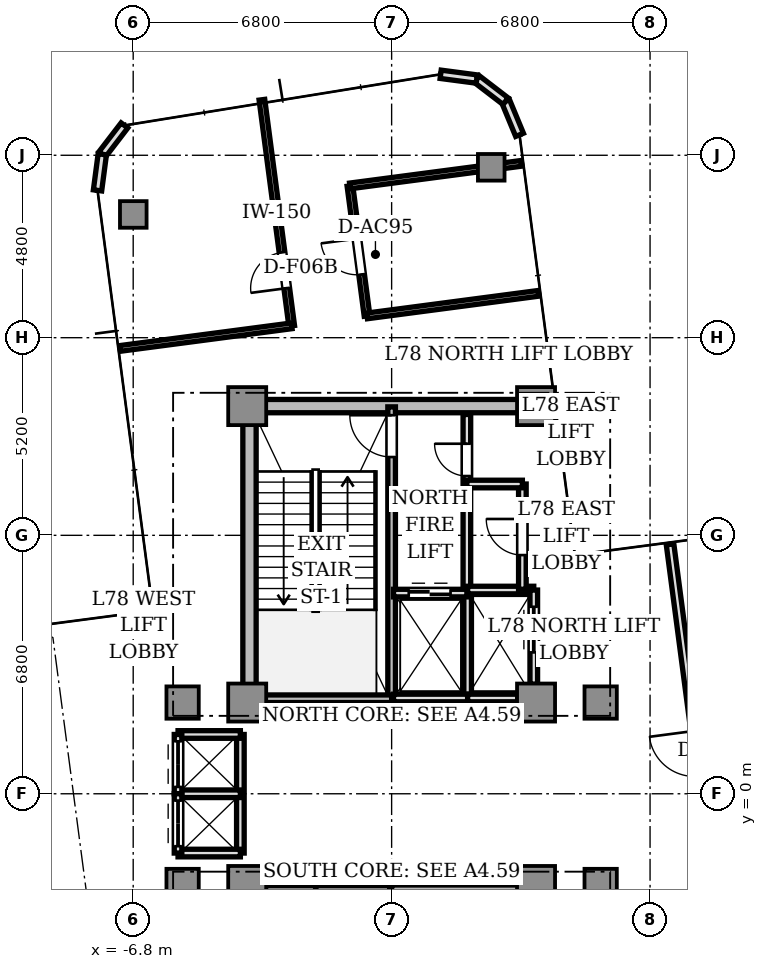
"""IFC4 building model, lengths in metres.
Left out: names, types, materials, properties, quantities, classifications, styles, units other than length and angle.
Written with IfcOpenShell. Run it as: python <this file> out.ifc"""

import sys

from ifc_helpers import new_model, si_unit, direction, frame, frame_2d, origin, origin_2d, place, context, subcontext, project, spatial, rectangle, extrude, source, transform, mapped, element, fill, save


model = new_model("IFC4")
c1 = context("Model", 3, precision=1e-05, world=origin(), true_north=direction((0.0, 1.0)))
c2 = subcontext(c1, "Body", "Model", "MODEL_VIEW")
j1 = project(units=[si_unit("LENGTHUNIT", "METRE"), si_unit("PLANEANGLEUNIT", "RADIAN")], contexts=[c1])
p1 = place(None, origin())
s1 = spatial("IfcSite", under=j1, at=p1, CompositionType="ELEMENT")
p2 = place(p1, origin())
s2 = spatial("IfcBuilding", under=s1, at=p2, CompositionType="ELEMENT")
p3 = place(p2, frame((0.0, 0.0, 280.3)))
s3 = spatial("IfcBuildingStorey", under=s2, at=p3, CompositionType="ELEMENT", Elevation=280.3)
p4 = place(p3, frame((-3.55, 10.2, 0.0), z_axis=(0.0, 0.0, 1.0), x_axis=(1.0, 0.0, 0.0)))
e1 = element("IfcWall", 1, at=p4, inside=s3, PredefinedType="SHEAR", context=c2, shape_type="SweptSolid", body=[
    extrude(rectangle(XDim=7.1, YDim=0.35, at=frame_2d((3.55, 0.0))), origin(), (0.0, 0.0, 1.0), 4.5),
])
p5 = place(p3, frame((-3.74, 2.85, 0.0), z_axis=(0.0, 0.0, 1.0), x_axis=(0.0, 1.0, 0.0)))
e2 = element("IfcWall", 2, at=p5, inside=s3, PredefinedType="SHEAR", context=c2, shape_type="SweptSolid", body=[
    extrude(rectangle(XDim=6.9, YDim=0.35, at=frame_2d((3.45, 0.0))), origin(), (0.0, 0.0, 1.0), 4.5),
])
m1 = source(origin(), c2, "Body", "SweptSolid", [
    extrude(rectangle(XDim=1.0, YDim=1.0, at=origin_2d()), origin(), (0.0, 0.0, 1.0), 4.5),
])
for number, where, z_axis, x_axis in (
    (3, (-3.8, 2.4, 0.0), (0.0, 0.0, 1.0), (1.0, 0.0, 0.0)),
    (4, (3.8, 2.4, 0.0), (0.0, 0.0, 1.0), (1.0, 0.0, 0.0)),
    (5, (-3.8, 10.2, 0.0), (0.0, 0.0, 1.0), (1.0, 0.0, 0.0)),
    (6, (3.8, 10.2, 0.0), (0.0, 0.0, 1.0), (1.0, 0.0, 0.0)),
    (7, (-3.8, -2.4, 0.0), (0.0, 0.0, 1.0), (1.0, 0.0, 0.0)),
    (8, (3.8, -2.4, 0.0), (0.0, 0.0, 1.0), (1.0, 0.0, 0.0)),
):
    element("IfcColumn", number, at=place(p3, frame(where, z_axis=z_axis, x_axis=x_axis)), inside=s3, PredefinedType="COLUMN", context=c2, shape_type="MappedRepresentation", body=[
        mapped(m1, transform((0.0, 0.0, 0.0), scale=1.0)),
    ])
m2 = source(origin(), c2, "Body", "SweptSolid", [
    extrude(rectangle(XDim=0.85, YDim=0.85, at=origin_2d()), origin(), (0.0, 0.0, 1.0), 4.5),
])
for number, where, z_axis, x_axis in (
    (9, (5.5, 2.4, 0.0), (0.0, 0.0, 1.0), (1.0, 0.0, 0.0)),
    (10, (-5.5, 2.4, 0.0), (0.0, 0.0, 1.0), (1.0, 0.0, 0.0)),
    (11, (5.5, -2.4, 0.0), (0.0, 0.0, 1.0), (1.0, 0.0, 0.0)),
    (12, (-5.5, -2.4, 0.0), (0.0, 0.0, 1.0), (1.0, 0.0, 0.0)),
):
    element("IfcColumn", number, at=place(p3, frame(where, z_axis=z_axis, x_axis=x_axis)), inside=s3, PredefinedType="COLUMN", context=c2, shape_type="MappedRepresentation", body=[
        mapped(m2, transform((0.0, 0.0, 0.0), scale=1.0)),
    ])
m3 = source(origin(), c2, "Body", "SweptSolid", [
    extrude(rectangle(XDim=0.7, YDim=0.7, at=origin_2d()), origin(), (0.0, 0.0, 1.0), 4.5),
])
for number, where, z_axis, x_axis in (
    (13, (2.621, 16.483, 0.0), (0.0, 0.0, 1.0), (1.0, 0.0, 0.0)),
    (14, (-6.798, 15.243, 0.0), (0.0, 0.0, 1.0), (1.0, 0.0, 0.0)),
):
    element("IfcColumn", number, at=place(p3, frame(where, z_axis=z_axis, x_axis=x_axis)), inside=s3, PredefinedType="COLUMN", context=c2, shape_type="MappedRepresentation", body=[
        mapped(m3, transform((0.0, 0.0, 0.0), scale=1.0)),
    ])
for number, where, z_axis, x_axis in (
    (15, (3.366, 17.338, 0.0), (0.0, 0.0, 1.0), (-0.383, 0.924, 0.0)),
    (16, (2.999, 18.222, 0.0), (0.0, 0.0, 1.0), (-0.793, 0.609, 0.0)),
    (17, (2.24, 18.805, 0.0), (0.0, 0.0, 1.0), (-0.991, 0.131, 0.0)),
):
    element("IfcWall", number, at=place(p3, frame(where, z_axis=z_axis, x_axis=x_axis)), inside=s3, PredefinedType="STANDARD", context=c2, shape_type="SweptSolid", body=[
        extrude(rectangle(XDim=0.958, YDim=0.22, at=frame_2d((0.479, 0.0))), origin(), (0.0, 0.0, 1.0), 4.5),
    ])
p6 = place(p3, frame((-7.031, 17.585, 0.0), z_axis=(0.0, 0.0, 1.0), x_axis=(-0.60861352168, -0.793466811674, 0.0)))
e18 = element("IfcWall", 18, at=p6, inside=s3, PredefinedType="STANDARD", context=c2, shape_type="SweptSolid", body=[
    extrude(rectangle(XDim=0.958, YDim=0.22, at=frame_2d((0.479, 0.0))), origin(), (0.0, 0.0, 1.0), 4.5),
])
p7 = place(p3, frame((-7.613, 16.825, 0.0), z_axis=(0.0, 0.0, 1.0), x_axis=(-0.130527053476, -0.991444747987, 0.0)))
e19 = element("IfcWall", 19, at=p7, inside=s3, PredefinedType="STANDARD", context=c2, shape_type="SweptSolid", body=[
    extrude(rectangle(XDim=0.958, YDim=0.22, at=frame_2d((0.479, 0.0))), origin(), (0.0, 0.0, 1.0), 4.5),
])
p8 = place(p3, frame((0.0, 2.5, 0.0), z_axis=(0.0, 0.0, 1.0), x_axis=(0.0, 1.0, 0.0)))
e20 = element("IfcWall", 20, at=p8, inside=s3, PredefinedType="SOLIDWALL", context=c2, shape_type="SweptSolid", body=[
    extrude(rectangle(XDim=7.68, YDim=0.2, at=frame_2d((3.84, 0.0))), origin(), (0.0, 0.0, 1.0), 4.5),
])
p9 = place(p8, frame((6.36, 0.0, 0.0)))
e21 = element("IfcOpeningElement", 21, at=p9, cuts=e20, PredefinedType="OPENING", context=c2, shape_type="SweptSolid", body=[
    extrude(rectangle(XDim=1.1, YDim=2.15, at=frame_2d((0.55, 1.075))), frame((0.0, 0.11, 0.0), z_axis=(0.0, -1.0, 0.0), x_axis=(1.0, 0.0, 0.0)), (0.0, 0.0, 1.0), 0.22),
])
p10 = place(p3, frame((-3.72, 2.5, 0.0), z_axis=(0.0, 0.0, 1.0), x_axis=(1.0, 0.0, 0.0)))
e22 = element("IfcWall", 22, at=p10, inside=s3, PredefinedType="SOLIDWALL", context=c2, shape_type="SweptSolid", body=[
    extrude(rectangle(XDim=3.72, YDim=0.2, at=frame_2d((1.86, 0.0))), origin(), (0.0, 0.0, 1.0), 4.5),
])
p11 = place(p3, frame((0.0, -10.18, 0.0), z_axis=(0.0, 0.0, 1.0), x_axis=(0.0, 1.0, 0.0)))
e23 = element("IfcWall", 23, at=p11, inside=s3, PredefinedType="SOLIDWALL", context=c2, shape_type="SweptSolid", body=[
    extrude(rectangle(XDim=7.68, YDim=0.2, at=frame_2d((3.84, 0.0))), origin(), (0.0, 0.0, 1.0), 4.5),
])
p12 = place(p11, frame((0.28, 0.0, 0.0)))
e24 = element("IfcOpeningElement", 24, at=p12, cuts=e23, PredefinedType="OPENING", context=c2, shape_type="SweptSolid", body=[
    extrude(rectangle(XDim=1.1, YDim=2.15, at=frame_2d((0.55, 1.075))), frame((0.0, 0.11, 0.0), z_axis=(0.0, -1.0, 0.0), x_axis=(1.0, 0.0, 0.0)), (0.0, 0.0, 1.0), 0.22),
])
p13 = place(p3, frame((0.0, -2.5, 0.0), z_axis=(0.0, 0.0, 1.0), x_axis=(1.0, 0.0, 0.0)))
e25 = element("IfcWall", 25, at=p13, inside=s3, PredefinedType="SOLIDWALL", context=c2, shape_type="SweptSolid", body=[
    extrude(rectangle(XDim=3.72, YDim=0.2, at=frame_2d((1.86, 0.0))), origin(), (0.0, 0.0, 1.0), 4.5),
])
p14 = place(p3, frame((1.98, 5.32, 0.0), z_axis=(0.0, 0.0, 1.0), x_axis=(0.0, 1.0, 0.0)))
e26 = element("IfcWall", 26, at=p14, inside=s3, PredefinedType="SOLIDWALL", context=c2, shape_type="SweptSolid", body=[
    extrude(rectangle(XDim=4.66, YDim=0.2, at=frame_2d((2.33, 0.0))), origin(), (0.0, 0.0, 1.0), 4.05),
])
p15 = place(p14, frame((3.04, 0.0, 0.0)))
e27 = element("IfcOpeningElement", 27, at=p15, cuts=e26, PredefinedType="OPENING", context=c2, shape_type="SweptSolid", body=[
    extrude(rectangle(XDim=0.85, YDim=2.1, at=frame_2d((0.425, 1.05))), frame((0.0, 0.11, 0.0), z_axis=(0.0, -1.0, 0.0), x_axis=(1.0, 0.0, 0.0)), (0.0, 0.0, 1.0), 0.22),
])
p16 = place(p3, frame((2.0, 2.5, 0.0), z_axis=(0.0, 0.0, 1.0), x_axis=(0.0, 1.0, 0.0)))
e28 = element("IfcWall", 28, at=p16, inside=s3, PredefinedType="SOLIDWALL", context=c2, shape_type="SweptSolid", body=[
    extrude(rectangle(XDim=2.78, YDim=0.2, at=frame_2d((1.39, 0.0))), origin(), (0.0, 0.0, 1.0), 4.05),
])
p17 = place(p3, frame((0.05, 2.52, 0.0), z_axis=(0.0, 0.0, 1.0), x_axis=(1.0, 0.0, 0.0)))
e29 = element("IfcWall", 29, at=p17, inside=s3, PredefinedType="SOLIDWALL", context=c2, shape_type="SweptSolid", body=[
    extrude(rectangle(XDim=1.95, YDim=0.2, at=frame_2d((0.975, 0.0))), origin(), (0.0, 0.0, 1.0), 4.05),
])
p18 = place(p3, frame((0.05, 5.28, 0.0), z_axis=(0.0, 0.0, 1.0), x_axis=(1.0, 0.0, 0.0)))
e30 = element("IfcWall", 30, at=p18, inside=s3, PredefinedType="SOLIDWALL", context=c2, shape_type="SweptSolid", body=[
    extrude(rectangle(XDim=1.93, YDim=0.2, at=frame_2d((0.965, 0.0))), origin(), (0.0, 0.0, 1.0), 4.05),
])
p19 = place(p18, frame((0.4, 0.0, 0.0)))
e31 = element("IfcOpeningElement", 31, at=p19, cuts=e30, PredefinedType="OPENING", context=c2, shape_type="SweptSolid", body=[
    extrude(rectangle(XDim=1.1, YDim=2.2, at=frame_2d((0.55, 1.1))), frame((0.0, 0.11, 0.0), z_axis=(0.0, -1.0, 0.0), x_axis=(1.0, 0.0, 0.0)), (0.0, 0.0, 1.0), 0.22),
])
p20 = place(p3, frame((-2.0, -5.28, 0.0), z_axis=(0.0, 0.0, 1.0), x_axis=(0.0, 1.0, 0.0)))
e32 = element("IfcWall", 32, at=p20, inside=s3, PredefinedType="SOLIDWALL", context=c2, shape_type="SweptSolid", body=[
    extrude(rectangle(XDim=2.78, YDim=0.2, at=frame_2d((1.39, 0.0))), origin(), (0.0, 0.0, 1.0), 4.05),
])
p21 = place(p3, frame((-2.0, -2.52, 0.0), z_axis=(0.0, 0.0, 1.0), x_axis=(1.0, 0.0, 0.0)))
e33 = element("IfcWall", 33, at=p21, inside=s3, PredefinedType="SOLIDWALL", context=c2, shape_type="SweptSolid", body=[
    extrude(rectangle(XDim=1.95, YDim=0.2, at=frame_2d((0.975, 0.0))), origin(), (0.0, 0.0, 1.0), 4.05),
])
p22 = place(p3, frame((2.0, 2.52, 0.0), z_axis=(0.0, 0.0, 1.0), x_axis=(1.0, 0.0, 0.0)))
e34 = element("IfcWall", 34, at=p22, inside=s3, PredefinedType="SOLIDWALL", context=c2, shape_type="SweptSolid", body=[
    extrude(rectangle(XDim=1.32, YDim=0.2, at=frame_2d((0.66, 0.0))), origin(), (0.0, 0.0, 1.0), 4.05),
])
p23 = place(p3, frame((2.0, 5.36, 0.0), z_axis=(0.0, 0.0, 1.0), x_axis=(1.0, 0.0, 0.0)))
e35 = element("IfcWall", 35, at=p23, inside=s3, PredefinedType="SOLIDWALL", context=c2, shape_type="SweptSolid", body=[
    extrude(rectangle(XDim=1.74, YDim=0.2, at=frame_2d((0.87, 0.0))), origin(), (0.0, 0.0, 1.0), 4.05),
])
p24 = place(p3, frame((3.74, 2.88, 0.0), z_axis=(0.0, 0.0, 1.0), x_axis=(0.0, 1.0, 0.0)))
e36 = element("IfcWall", 36, at=p24, inside=s3, PredefinedType="SOLIDWALL", context=c2, shape_type="SweptSolid", body=[
    extrude(rectangle(XDim=2.48, YDim=0.2, at=frame_2d((1.24, 0.0))), origin(), (0.0, 0.0, 1.0), 4.05),
])
p25 = place(p24, frame((0.84, 0.0, 0.0)))
e37 = element("IfcOpeningElement", 37, at=p25, cuts=e36, PredefinedType="OPENING", context=c2, shape_type="SweptSolid", body=[
    extrude(rectangle(XDim=1.2, YDim=2.2, at=frame_2d((0.6, 1.1))), frame((0.0, 0.11, 0.0), z_axis=(0.0, -1.0, 0.0), x_axis=(1.0, 0.0, 0.0)), (0.0, 0.0, 1.0), 0.22),
])
p26 = place(p3, frame((-3.32, -2.52, 0.0), z_axis=(0.0, 0.0, 1.0), x_axis=(1.0, 0.0, 0.0)))
e38 = element("IfcWall", 38, at=p26, inside=s3, PredefinedType="SOLIDWALL", context=c2, shape_type="SweptSolid", body=[
    extrude(rectangle(XDim=1.32, YDim=0.2, at=frame_2d((0.66, 0.0))), origin(), (0.0, 0.0, 1.0), 4.05),
])
p27 = place(p3, frame((-3.98, -1.56, 0.0), z_axis=(0.0, 0.0, 1.0), x_axis=(0.0, 1.0, 0.0)))
e39 = element("IfcWall", 39, at=p27, inside=s3, PredefinedType="SOLIDWALL", context=c2, shape_type="SweptSolid", body=[
    extrude(rectangle(XDim=3.12, YDim=0.2, at=frame_2d((1.56, 0.0))), origin(), (0.0, 0.0, 1.0), 3.72),
])
for number, where, z_axis, x_axis in (
    (40, (-5.62, 1.56, 0.0), (0.0, 0.0, 1.0), (1.0, 0.0, 0.0)),
    (41, (-5.62, -1.56, 0.0), (0.0, 0.0, 1.0), (1.0, 0.0, 0.0)),
    (42, (-5.62, 0.0, 0.0), (0.0, 0.0, 1.0), (1.0, 0.0, 0.0)),
):
    element("IfcWall", number, at=place(p3, frame(where, z_axis=z_axis, x_axis=x_axis)), inside=s3, PredefinedType="SOLIDWALL", context=c2, shape_type="SweptSolid", body=[
        extrude(rectangle(XDim=1.64, YDim=0.2, at=frame_2d((0.82, 0.0))), origin(), (0.0, 0.0, 1.0), 4.05),
    ])
p28 = place(p3, frame((-5.62, 0.0, 0.0), z_axis=(0.0, 0.0, 1.0), x_axis=(0.0, 1.0, 0.0)))
e43 = element("IfcWall", 43, at=p28, inside=s3, PredefinedType="SOLIDWALL", context=c2, shape_type="SweptSolid", body=[
    extrude(rectangle(XDim=1.56, YDim=0.2, at=frame_2d((0.78, 0.0))), origin(), (0.0, 0.0, 1.0), 4.05),
])
p29 = place(p28, frame((0.18, 0.0, 0.0)))
e44 = element("IfcOpeningElement", 44, at=p29, cuts=e43, PredefinedType="OPENING", context=c2, shape_type="SweptSolid", body=[
    extrude(rectangle(XDim=1.2, YDim=2.2, at=frame_2d((0.6, 1.1))), frame((0.0, 0.11, 0.0), z_axis=(0.0, -1.0, 0.0), x_axis=(1.0, 0.0, 0.0)), (0.0, 0.0, 1.0), 0.22),
])
p30 = place(p3, frame((-5.62, -1.56, 0.0), z_axis=(0.0, 0.0, 1.0), x_axis=(0.0, 1.0, 0.0)))
e45 = element("IfcWall", 45, at=p30, inside=s3, PredefinedType="SOLIDWALL", context=c2, shape_type="SweptSolid", body=[
    extrude(rectangle(XDim=1.56, YDim=0.2, at=frame_2d((0.78, 0.0))), origin(), (0.0, 0.0, 1.0), 4.05),
])
p31 = place(p30, frame((0.18, 0.0, 0.0)))
e46 = element("IfcOpeningElement", 46, at=p31, cuts=e45, PredefinedType="OPENING", context=c2, shape_type="SweptSolid", body=[
    extrude(rectangle(XDim=1.2, YDim=2.2, at=frame_2d((0.6, 1.1))), frame((0.0, 0.11, 0.0), z_axis=(0.0, -1.0, 0.0), x_axis=(1.0, 0.0, 0.0)), (0.0, 0.0, 1.0), 0.22),
])
p32 = place(p3, frame((3.44, 5.38, 0.0), z_axis=(0.0, 0.0, 1.0), x_axis=(0.0, 1.0, 0.0)))
e47 = element("IfcWall", 47, at=p32, inside=s3, PredefinedType="SOLIDWALL", context=c2, shape_type="SweptSolid", body=[
    extrude(rectangle(XDim=2.77, YDim=0.2, at=frame_2d((1.385, 0.0))), origin(), (0.0, 0.0, 1.0), 4.05),
])
p33 = place(p32, frame((0.9, 0.0, 0.0)))
e48 = element("IfcOpeningElement", 48, at=p33, cuts=e47, PredefinedType="OPENING", context=c2, shape_type="SweptSolid", body=[
    extrude(rectangle(XDim=0.95, YDim=2.15, at=frame_2d((0.475, 1.075))), frame((0.0, 0.11, 0.0), z_axis=(0.0, -1.0, 0.0), x_axis=(1.0, 0.0, 0.0)), (0.0, 0.0, 1.0), 0.22),
])
p34 = place(p3, frame((1.98, 8.15, 0.0), z_axis=(0.0, 0.0, 1.0), x_axis=(1.0, 0.0, 0.0)))
e49 = element("IfcWall", 49, at=p34, inside=s3, PredefinedType="SOLIDWALL", context=c2, shape_type="SweptSolid", body=[
    extrude(rectangle(XDim=1.46, YDim=0.2, at=frame_2d((0.73, 0.0))), origin(), (0.0, 0.0, 1.0), 4.05),
])
p35 = place(p3, frame((8.775, -4.443, 0.0), z_axis=(0.0, 0.0, 1.0), x_axis=(-0.130515390239, 0.991446283422, 0.0)))
e50 = element("IfcWall", 50, at=p35, inside=s3, PredefinedType="SOLIDWALL", context=c2, shape_type="SweptSolid", body=[
    extrude(rectangle(XDim=11.1, YDim=0.2, at=frame_2d((5.55, 0.0))), origin(), (0.0, 0.0, 1.0), 4.05),
])
p36 = place(p35, frame((4.95, 0.0, 0.0)))
e51 = element("IfcOpeningElement", 51, at=p36, cuts=e50, PredefinedType="OPENING", context=c2, shape_type="SweptSolid", body=[
    extrude(rectangle(XDim=1.2, YDim=2.2, at=frame_2d((0.6, 1.1))), frame((0.0, 0.11, 0.0), z_axis=(0.0, -1.0, 0.0), x_axis=(1.0, 0.0, 0.0)), (0.0, 0.0, 1.0), 0.22),
])
p37 = place(p3, frame((-2.629, 12.312, 0.0), z_axis=(0.0, 0.0, 1.0), x_axis=(-0.130532401413, 0.991444043898, 0.0)))
e52 = element("IfcWall", 52, at=p37, inside=s3, PredefinedType="PARTITIONING", context=c2, shape_type="SweptSolid", body=[
    extrude(rectangle(XDim=6.0, YDim=0.15, at=frame_2d((3.0, 0.0))), origin(), (0.0, 0.0, 1.0), 4.05),
])
p38 = place(p37, frame((1.0, 0.0, 0.0)))
e53 = element("IfcOpeningElement", 53, at=p38, cuts=e52, PredefinedType="OPENING", context=c2, shape_type="SweptSolid", body=[
    extrude(rectangle(XDim=0.95, YDim=2.15, at=frame_2d((0.475, 1.075))), frame((0.0, 0.085, 0.0), z_axis=(0.0, -1.0, 0.0), x_axis=(1.0, 0.0, 0.0)), (0.0, 0.0, 1.0), 0.17),
])
p39 = place(p3, frame((-2.629, 12.312, 0.0), z_axis=(0.0, 0.0, 1.0), x_axis=(-0.991449546596, -0.130490599487, 0.0)))
e54 = element("IfcWall", 54, at=p39, inside=s3, PredefinedType="PARTITIONING", context=c2, shape_type="SweptSolid", body=[
    extrude(rectangle(XDim=4.55, YDim=0.15, at=frame_2d((2.275, 0.0))), origin(), (0.0, 0.0, 1.0), 4.05),
])
p40 = place(p3, frame((-0.647, 12.573, 0.0), z_axis=(0.0, 0.0, 1.0), x_axis=(-0.130494785718, 0.991448995612, 0.0)))
e55 = element("IfcWall", 55, at=p40, inside=s3, PredefinedType="PARTITIONING", context=c2, shape_type="SweptSolid", body=[
    extrude(rectangle(XDim=3.45, YDim=0.15, at=frame_2d((1.725, 0.0))), origin(), (0.0, 0.0, 1.0), 4.05),
])
p41 = place(p40, frame((1.1, 0.0, 0.0)))
e56 = element("IfcOpeningElement", 56, at=p41, cuts=e55, PredefinedType="OPENING", context=c2, shape_type="SweptSolid", body=[
    extrude(rectangle(XDim=0.95, YDim=2.15, at=frame_2d((0.475, 1.075))), frame((0.0, 0.085, 0.0), z_axis=(0.0, -1.0, 0.0), x_axis=(1.0, 0.0, 0.0)), (0.0, 0.0, 1.0), 0.17),
])
p42 = place(p3, frame((3.865, 13.167, 0.0), z_axis=(0.0, 0.0, 1.0), x_axis=(-0.991449546596, -0.130490599487, 0.0)))
e57 = element("IfcWall", 57, at=p42, inside=s3, PredefinedType="PARTITIONING", context=c2, shape_type="SweptSolid", body=[
    extrude(rectangle(XDim=4.55, YDim=0.15, at=frame_2d((2.275, 0.0))), origin(), (0.0, 0.0, 1.0), 4.05),
])
p43 = place(p3, frame((3.414, 16.587, 0.0), z_axis=(0.0, 0.0, 1.0), x_axis=(-0.991448632885, -0.130497541548, 0.0)))
e58 = element("IfcWall", 58, at=p43, inside=s3, PredefinedType="PARTITIONING", context=c2, shape_type="SweptSolid", body=[
    extrude(rectangle(XDim=4.55, YDim=0.15, at=frame_2d((2.275, 0.0))), origin(), (0.0, 0.0, 1.0), 4.02),
])
m4 = source(origin(), c2, "Body", "SweptSolid", [
    extrude(rectangle(XDim=1.1, YDim=0.05, at=origin_2d()), origin(), (0.0, 0.0, 1.0), 2.15),
])
p44 = place(p9, frame((0.55, 0.0, 0.0)))
e59 = element("IfcDoor", 59, at=p44, inside=s3, OperationType="SINGLE_SWING_RIGHT", PredefinedType="DOOR", context=c2, shape_type="MappedRepresentation", body=[
    mapped(m4, transform((0.0, 0.0, 0.0), scale=1.0)),
])
fill(e21, e59)
m5 = source(origin(), c2, "Body", "SweptSolid", [
    extrude(rectangle(XDim=0.85, YDim=0.05, at=origin_2d()), origin(), (0.0, 0.0, 1.0), 2.1),
])
p45 = place(p15, frame((0.425, 0.0, 0.0)))
e60 = element("IfcDoor", 60, at=p45, inside=s3, OperationType="SINGLE_SWING_RIGHT", PredefinedType="DOOR", context=c2, shape_type="MappedRepresentation", body=[
    mapped(m5, transform((0.0, 0.0, 0.0), scale=1.0)),
])
fill(e27, e60)
m6 = source(origin(), c2, "Body", "SweptSolid", [
    extrude(rectangle(XDim=1.1, YDim=0.05, at=origin_2d()), origin(), (0.0, 0.0, 1.0), 2.2),
])
p46 = place(p19, frame((0.55, 0.0, 0.0)))
e61 = element("IfcDoor", 61, at=p46, inside=s3, OperationType="DOUBLE_DOOR_SLIDING", PredefinedType="DOOR", context=c2, shape_type="MappedRepresentation", body=[
    mapped(m6, transform((0.0, 0.0, 0.0), scale=1.0)),
])
fill(e31, e61)
m7 = source(origin(), c2, "Body", "SweptSolid", [
    extrude(rectangle(XDim=1.2, YDim=0.05, at=origin_2d()), origin(), (0.0, 0.0, 1.0), 2.2),
])
p47 = place(p25, frame((0.6, 0.0, 0.0)))
e62 = element("IfcDoor", 62, at=p47, inside=s3, OperationType="DOUBLE_DOOR_SLIDING", PredefinedType="DOOR", context=c2, shape_type="MappedRepresentation", body=[
    mapped(m7, transform((0.0, 0.0, 0.0), scale=1.0)),
])
fill(e37, e62)
p48 = place(p29, frame((0.6, 0.0, 0.0)))
e63 = element("IfcDoor", 63, at=p48, inside=s3, OperationType="DOUBLE_DOOR_SLIDING", PredefinedType="DOOR", context=c2, shape_type="MappedRepresentation", body=[
    mapped(m7, transform((0.0, 0.0, 0.0), scale=1.0)),
])
fill(e44, e63)
p49 = place(p31, frame((0.6, 0.0, 0.0)))
e64 = element("IfcDoor", 64, at=p49, inside=s3, OperationType="DOUBLE_DOOR_SLIDING", PredefinedType="DOOR", context=c2, shape_type="MappedRepresentation", body=[
    mapped(m7, transform((0.0, 0.0, 0.0), scale=1.0)),
])
fill(e46, e64)
m8 = source(origin(), c2, "Body", "SweptSolid", [
    extrude(rectangle(XDim=0.95, YDim=0.05, at=origin_2d()), origin(), (0.0, 0.0, 1.0), 2.15),
])
p50 = place(p33, frame((0.475, 0.0, 0.0)))
e65 = element("IfcDoor", 65, at=p50, inside=s3, OperationType="SINGLE_SWING_RIGHT", PredefinedType="DOOR", context=c2, shape_type="MappedRepresentation", body=[
    mapped(m8, transform((0.0, 0.0, 0.0), scale=1.0)),
])
fill(e48, e65)
p51 = place(p38, frame((0.475, 0.0, 0.0)))
e66 = element("IfcDoor", 66, at=p51, inside=s3, OperationType="SINGLE_SWING_LEFT", PredefinedType="DOOR", context=c2, shape_type="MappedRepresentation", body=[
    mapped(m8, transform((0.0, 0.0, 0.0), scale=1.0)),
])
fill(e53, e66)
p52 = place(p41, frame((0.475, 0.0, 0.0)))
e67 = element("IfcDoor", 67, at=p52, inside=s3, OperationType="SINGLE_SWING_RIGHT", PredefinedType="DOOR", context=c2, shape_type="MappedRepresentation", body=[
    mapped(m8, transform((0.0, 0.0, 0.0), scale=1.0)),
])
fill(e56, e67)
save(model, sys.argv[1])
